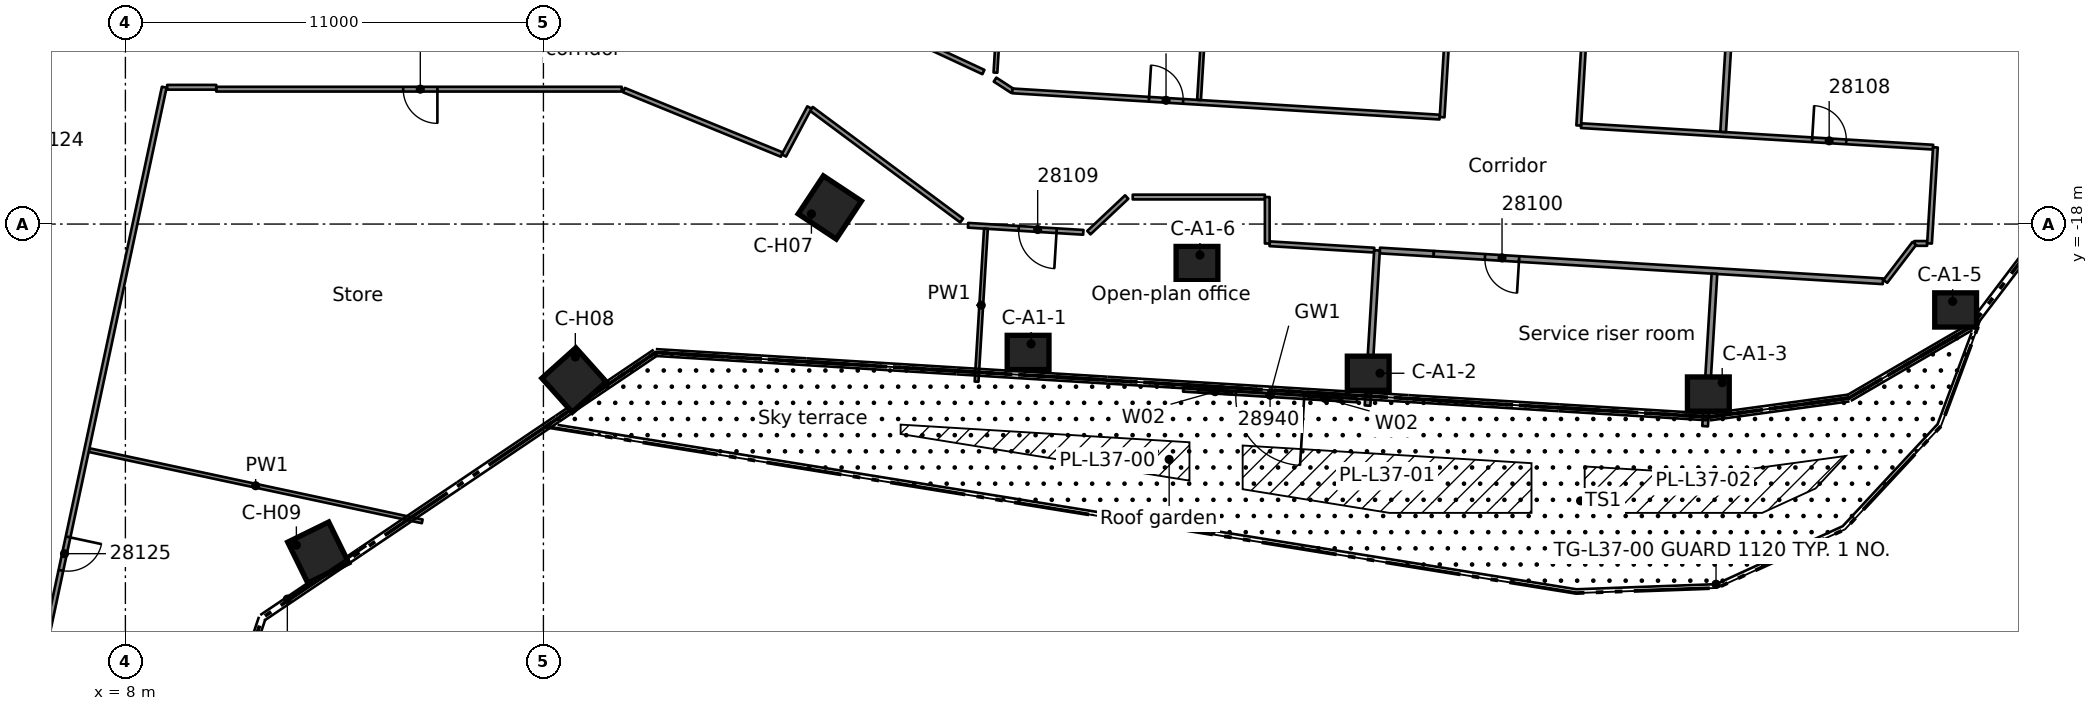
"""IFC4 building model, lengths in metres.
Left out: names, types, materials, properties, quantities, classifications, styles, units other than length and angle.
Written with IfcOpenShell. Run it as: python <this file> out.ifc"""

import sys

from ifc_helpers import new_model, si_unit, direction, frame, frame_2d, origin, origin_2d, place, context, subcontext, project, spatial, rectangle, extrude, element, fill, save


model = new_model("IFC4")
c1 = context("Model", 3, precision=1e-05, world=origin(), true_north=direction((0.0, 1.0)))
c2 = subcontext(c1, "Body", "Model", "MODEL_VIEW")
j1 = project(units=[si_unit("LENGTHUNIT", "METRE"), si_unit("PLANEANGLEUNIT", "RADIAN")], contexts=[c1])
p1 = place(None, origin())
s1 = spatial("IfcSite", under=j1, at=p1, CompositionType="ELEMENT")
p2 = place(p1, origin())
s2 = spatial("IfcBuilding", under=s1, at=p2, CompositionType="ELEMENT")
p3 = place(p2, frame((0.0, 0.0, 145.6)))
s3 = spatial("IfcBuildingStorey", under=s2, at=p3, CompositionType="ELEMENT", Elevation=145.6)
for number, where, z_axis, x_axis in (
    (1, (31.754, -21.378, 0.0), (0.0, 0.0, 1.0), (1.0, 0.0, 0.0)),
    (2, (40.704, -21.926, 0.0), (0.0, 0.0, 1.0), (1.0, 0.0, 0.0)),
    (3, (49.654, -22.473, 0.0), (0.0, 0.0, 1.0), (1.0, 0.0, 0.0)),
    (4, (56.161, -20.26, 0.0), (0.0, 0.0, 1.0), (1.0, 0.0, 0.0)),
    (5, (36.198, -19.039, 0.0), (0.0, 0.0, 1.0), (1.0, 0.0, 0.0)),
):
    element("IfcColumn", number, at=place(p3, frame(where, z_axis=z_axis, x_axis=x_axis)), inside=s3, PredefinedType="COLUMN", context=c2, shape_type="SweptSolid", body=[
        extrude(rectangle(XDim=1.1, YDim=0.9, at=origin_2d()), origin(), (0.0, 0.0, 1.0), 3.5),
    ])
for number, where, z_axis, x_axis in (
    (6, (26.536, -17.564, 0.0), (0.0, 0.0, 1.0), (0.834, -0.552, 0.0)),
    (7, (19.806, -22.104, 0.0), (0.0, 0.0, 1.0), (0.667, -0.745, 0.0)),
    (8, (13.075, -26.644, 0.0), (0.0, 0.0, 1.0), (0.441, -0.898, 0.0)),
):
    element("IfcColumn", number, at=place(p3, frame(where, z_axis=z_axis, x_axis=x_axis)), inside=s3, PredefinedType="COLUMN", context=c2, shape_type="SweptSolid", body=[
        extrude(rectangle(XDim=1.2, YDim=1.2, at=origin_2d()), origin(), (0.0, 0.0, 1.0), 3.5),
    ])
p4 = place(p3, frame((40.407, -22.639, 0.0), z_axis=(0.0, 0.0, 1.0), x_axis=(-0.998136271082, 0.061024456984, 0.0)))
e9 = element("IfcWall", 9, at=p4, inside=s3, PredefinedType="STANDARD", context=c2, shape_type="SweptSolid", body=[
    extrude(rectangle(XDim=4.581, YDim=0.1, at=frame_2d((2.291, 0.0))), origin(), (0.0, 0.0, 1.0), 3.1),
])
p5 = place(p4, frame((1.39, 0.0, 0.0)))
e10 = element("IfcOpeningElement", 10, at=p5, cuts=e9, PredefinedType="OPENING", context=c2, shape_type="SweptSolid", body=[
    extrude(rectangle(XDim=1.8, YDim=2.4, at=frame_2d((0.9, 1.2))), frame((0.0, 0.06, 0.0), z_axis=(0.0, -1.0, 0.0), x_axis=(1.0, 0.0, 0.0)), (0.0, 0.0, 1.0), 0.12),
])
p6 = place(p4, frame((0.39, 0.0, 0.0)))
e11 = element("IfcOpeningElement", 11, at=p6, cuts=e9, PredefinedType="OPENING", context=c2, shape_type="SweptSolid", body=[
    extrude(rectangle(XDim=0.9, YDim=2.4, at=frame_2d((0.45, 1.2))), frame((0.0, 0.06, 0.0), z_axis=(0.0, -1.0, 0.0), x_axis=(1.0, 0.0, 0.0)), (0.0, 0.0, 1.0), 0.12),
])
p7 = place(p4, frame((3.29, 0.0, 0.0)))
e12 = element("IfcOpeningElement", 12, at=p7, cuts=e9, PredefinedType="OPENING", context=c2, shape_type="SweptSolid", body=[
    extrude(rectangle(XDim=0.9, YDim=2.4, at=frame_2d((0.45, 1.2))), frame((0.0, 0.06, 0.0), z_axis=(0.0, -1.0, 0.0), x_axis=(1.0, 0.0, 0.0)), (0.0, 0.0, 1.0), 0.12),
])
p8 = place(p3, frame((26.05, -14.969, 0.0), z_axis=(0.0, 0.0, 1.0), x_axis=(0.802733003706, -0.596338599087, 0.0)))
e13 = element("IfcWall", 13, at=p8, inside=s3, PredefinedType="PARTITIONING", context=c2, shape_type="SweptSolid", body=[
    extrude(rectangle(XDim=4.927, YDim=0.125, at=frame_2d((2.463, 0.0))), origin(), (0.0, 0.0, 1.0), 3.08),
])
p9 = place(p3, frame((30.578, -14.0, 0.0), z_axis=(0.0, 0.0, 1.0), x_axis=(-0.906684476779, 0.421809506257, 0.0)))
e14 = element("IfcWall", 14, at=p9, inside=s3, PredefinedType="PARTITIONING", context=c2, shape_type="SweptSolid", body=[
    extrude(rectangle(XDim=5.927, YDim=0.125, at=frame_2d((2.963, 0.0))), origin(), (0.0, 0.0, 1.0), 3.08),
])
p10 = place(p3, frame((30.884, -14.199, 0.0), z_axis=(0.0, 0.0, 1.0), x_axis=(0.838402684299, -0.545051317731, 0.0)))
e15 = element("IfcWall", 15, at=p10, inside=s3, PredefinedType="PARTITIONING", context=c2, shape_type="SweptSolid", body=[
    extrude(rectangle(XDim=0.545, YDim=0.125, at=frame_2d((0.272, 0.0))), origin(), (0.0, 0.0, 1.0), 3.08),
])
p11 = place(p3, frame((21.118, -14.475, 0.0), z_axis=(0.0, 0.0, 1.0), x_axis=(0.925826662129, -0.377948398187, 0.0)))
e16 = element("IfcWall", 16, at=p11, inside=s3, PredefinedType="PARTITIONING", context=c2, shape_type="SweptSolid", body=[
    extrude(rectangle(XDim=4.487, YDim=0.125, at=frame_2d((2.243, 0.0))), origin(), (0.0, 0.0, 1.0), 3.08),
])
p12 = place(p3, frame((7.044, -23.948, 0.0), z_axis=(0.0, 0.0, 1.0), x_axis=(0.977886023379, -0.209138531316, 0.0)))
e17 = element("IfcWall", 17, at=p12, inside=s3, PredefinedType="PARTITIONING", context=c2, shape_type="SweptSolid", body=[
    extrude(rectangle(XDim=8.965, YDim=0.1, at=frame_2d((4.483, 0.0))), origin(), (0.0, 0.0, 1.0), 3.08),
])
p13 = place(p3, frame((41.01, -18.696, 0.0), z_axis=(0.0, 0.0, 1.0), x_axis=(0.99817100985, -0.060453578023, 0.0)))
e18 = element("IfcWall", 18, at=p13, inside=s3, PredefinedType="PARTITIONING", context=c2, shape_type="SweptSolid", body=[
    extrude(rectangle(XDim=1.422, YDim=0.15, at=frame_2d((0.711, 0.0))), origin(), (0.0, 0.0, 1.0), 3.08),
])
p14 = place(p3, frame((33.207, -18.218, 0.0), z_axis=(0.0, 0.0, 1.0), x_axis=(-0.998124126211, 0.061222779053, 0.0)))
e19 = element("IfcWall", 19, at=p14, inside=s3, PredefinedType="PARTITIONING", context=c2, shape_type="SweptSolid", body=[
    extrude(rectangle(XDim=3.039, YDim=0.125, at=frame_2d((1.519, 0.0))), origin(), (0.0, 0.0, 1.0), 3.08),
])
p15 = place(p14, frame((0.704, 0.0, 0.0)))
e20 = element("IfcOpeningElement", 20, at=p15, cuts=e19, PredefinedType="OPENING", context=c2, shape_type="SweptSolid", body=[
    extrude(rectangle(XDim=1.0, YDim=2.1, at=frame_2d((0.5, 1.05))), frame((0.0, 0.073, 0.0), z_axis=(0.0, -1.0, 0.0), x_axis=(1.0, 0.0, 0.0)), (0.0, 0.0, 1.0), 0.145),
])
p16 = place(p3, frame((38.11, -18.518, 0.0), z_axis=(0.0, 0.0, 1.0), x_axis=(0.998139847716, -0.060965928199, 0.0)))
e21 = element("IfcWall", 21, at=p16, inside=s3, PredefinedType="PARTITIONING", context=c2, shape_type="SweptSolid", body=[
    extrude(rectangle(XDim=2.755, YDim=0.125, at=frame_2d((1.377, 0.0))), origin(), (0.0, 0.0, 1.0), 3.08),
])
p17 = place(p3, frame((54.248, -19.506, 0.0), z_axis=(0.0, 0.0, 1.0), x_axis=(-0.99812844047, 0.061152402438, 0.0)))
e22 = element("IfcWall", 22, at=p17, inside=s3, PredefinedType="PARTITIONING", context=c2, shape_type="SweptSolid", body=[
    extrude(rectangle(XDim=11.841, YDim=0.15, at=frame_2d((5.921, 0.0))), origin(), (0.0, 0.0, 1.0), 3.08),
])
p18 = place(p17, frame((9.592, 0.0, 0.0)))
e23 = element("IfcOpeningElement", 23, at=p18, cuts=e22, PredefinedType="OPENING", context=c2, shape_type="SweptSolid", body=[
    extrude(rectangle(XDim=0.9, YDim=2.1, at=frame_2d((0.45, 1.05))), frame((0.0, 0.085, 0.0), z_axis=(0.0, -1.0, 0.0), x_axis=(1.0, 0.0, 0.0)), (0.0, 0.0, 1.0), 0.17),
])
p19 = place(p3, frame((31.341, -14.496, 0.0), z_axis=(0.0, 0.0, 1.0), x_axis=(0.998121712121, -0.061262123633, 0.0)))
e24 = element("IfcWall", 24, at=p19, inside=s3, PredefinedType="PARTITIONING", context=c2, shape_type="SweptSolid", body=[
    extrude(rectangle(XDim=11.262, YDim=0.125, at=frame_2d((5.631, 0.0))), origin(), (0.0, 0.0, 1.0), 3.08),
])
p20 = place(p19, frame((3.6, 0.0, 0.0)))
e25 = element("IfcOpeningElement", 25, at=p20, cuts=e24, PredefinedType="OPENING", context=c2, shape_type="SweptSolid", body=[
    extrude(rectangle(XDim=0.9, YDim=2.1, at=frame_2d((0.45, 1.05))), frame((0.0, 0.073, 0.0), z_axis=(0.0, -1.0, 0.0), x_axis=(1.0, 0.0, 0.0)), (0.0, 0.0, 1.0), 0.145),
])
p21 = place(p3, frame((46.305, -15.411, 0.0), z_axis=(0.0, 0.0, 1.0), x_axis=(0.998136924193, -0.061013773551, 0.0)))
e26 = element("IfcWall", 26, at=p21, inside=s3, PredefinedType="PARTITIONING", context=c2, shape_type="SweptSolid", body=[
    extrude(rectangle(XDim=9.279, YDim=0.125, at=frame_2d((4.64, 0.0))), origin(), (0.0, 0.0, 1.0), 3.08),
])
p22 = place(p21, frame((6.091, 0.0, 0.0)))
e27 = element("IfcOpeningElement", 27, at=p22, cuts=e26, PredefinedType="OPENING", context=c2, shape_type="SweptSolid", body=[
    extrude(rectangle(XDim=0.9, YDim=2.1, at=frame_2d((0.45, 1.05))), frame((0.0, 0.073, 0.0), z_axis=(0.0, -1.0, 0.0), x_axis=(1.0, 0.0, 0.0)), (0.0, 0.0, 1.0), 0.145),
])
p23 = place(p3, frame((55.073, -18.51, 0.0), z_axis=(0.0, 0.0, 1.0), x_axis=(1.0, 0.0, 0.0)))
e28 = element("IfcWall", 28, at=p23, inside=s3, PredefinedType="PARTITIONING", context=c2, shape_type="SweptSolid", body=[
    extrude(rectangle(XDim=0.338, YDim=0.125, at=frame_2d((0.169, 0.0))), origin(), (0.0, 0.0, 1.0), 3.08),
])
p24 = place(p3, frame((34.507, -17.289, 0.0), z_axis=(0.0, 0.0, 1.0), x_axis=(1.0, 0.0, 0.0)))
e29 = element("IfcWall", 29, at=p24, inside=s3, PredefinedType="PARTITIONING", context=c2, shape_type="SweptSolid", body=[
    extrude(rectangle(XDim=3.477, YDim=0.125, at=frame_2d((1.738, 0.0))), origin(), (0.0, 0.0, 1.0), 3.08),
])
p25 = place(p3, frame((21.06, -14.451, 0.0), z_axis=(0.0, 0.0, 1.0), x_axis=(-1.0, 0.0, 0.0)))
e30 = element("IfcWall", 30, at=p25, inside=s3, PredefinedType="PARTITIONING", context=c2, shape_type="SweptSolid", body=[
    extrude(rectangle(XDim=10.669, YDim=0.125, at=frame_2d((5.334, 0.0))), origin(), (0.0, 0.0, 1.0), 3.08),
])
p26 = place(p25, frame((4.85, 0.0, 0.0)))
e31 = element("IfcOpeningElement", 31, at=p26, cuts=e30, PredefinedType="OPENING", context=c2, shape_type="SweptSolid", body=[
    extrude(rectangle(XDim=0.9, YDim=2.1, at=frame_2d((0.45, 1.05))), frame((0.0, 0.073, 0.0), z_axis=(0.0, -1.0, 0.0), x_axis=(1.0, 0.0, 0.0)), (0.0, 0.0, 1.0), 0.145),
])
p27 = place(p3, frame((9.099, -14.401, 0.0), z_axis=(0.0, 0.0, 1.0), x_axis=(1.0, 0.0, 0.0)))
e32 = element("IfcWall", 32, at=p27, inside=s3, PredefinedType="PARTITIONING", context=c2, shape_type="SweptSolid", body=[
    extrude(rectangle(XDim=1.292, YDim=0.125, at=frame_2d((0.646, 0.0))), origin(), (0.0, 0.0, 1.0), 3.08),
])
p28 = place(p3, frame((33.353, -18.226, 0.0), z_axis=(0.0, 0.0, 1.0), x_axis=(0.728378164572, 0.685175342066, 0.0)))
e33 = element("IfcWall", 33, at=p28, inside=s3, PredefinedType="PARTITIONING", context=c2, shape_type="SweptSolid", body=[
    extrude(rectangle(XDim=1.367, YDim=0.125, at=frame_2d((0.684, 0.0))), origin(), (0.0, 0.0, 1.0), 3.08),
])
p29 = place(p3, frame((26.0, -14.932, 0.0), z_axis=(0.0, 0.0, 1.0), x_axis=(-0.469063701963, -0.883164335501, 0.0)))
e34 = element("IfcWall", 34, at=p29, inside=s3, PredefinedType="PARTITIONING", context=c2, shape_type="SweptSolid", body=[
    extrude(rectangle(XDim=1.43, YDim=0.125, at=frame_2d((0.715, 0.0))), origin(), (0.0, 0.0, 1.0), 3.08),
])
p30 = place(p3, frame((9.022, -14.399, 0.0), z_axis=(0.0, 0.0, 1.0), x_axis=(-0.209107827196, -0.977892589503, 0.0)))
e35 = element("IfcWall", 35, at=p30, inside=s3, PredefinedType="PARTITIONING", context=c2, shape_type="SweptSolid", body=[
    extrude(rectangle(XDim=15.595, YDim=0.125, at=frame_2d((7.797, 0.0))), origin(), (0.0, 0.0, 1.0), 3.08),
])
p31 = place(p30, frame((12.101, 0.0, 0.0)))
e36 = element("IfcOpeningElement", 36, at=p31, cuts=e35, PredefinedType="OPENING", context=c2, shape_type="SweptSolid", body=[
    extrude(rectangle(XDim=0.9, YDim=2.1, at=frame_2d((0.45, 1.05))), frame((0.0, 0.073, 0.0), z_axis=(0.0, -1.0, 0.0), x_axis=(1.0, 0.0, 0.0)), (0.0, 0.0, 1.0), 0.145),
])
p32 = place(p3, frame((55.474, -18.51, 0.0), z_axis=(0.0, 0.0, 1.0), x_axis=(0.061112023101, 0.998130913574, 0.0)))
e37 = element("IfcWall", 37, at=p32, inside=s3, PredefinedType="PARTITIONING", context=c2, shape_type="SweptSolid", body=[
    extrude(rectangle(XDim=2.533, YDim=0.125, at=frame_2d((1.266, 0.0))), origin(), (0.0, 0.0, 1.0), 3.08),
])
p33 = place(p3, frame((49.569, -23.319, 0.0), z_axis=(0.0, 0.0, 1.0), x_axis=(0.060951910255, 0.998140703827, 0.0)))
e38 = element("IfcWall", 38, at=p33, inside=s3, PredefinedType="PARTITIONING", context=c2, shape_type="SweptSolid", body=[
    extrude(rectangle(XDim=4.018, YDim=0.15, at=frame_2d((2.009, 0.0))), origin(), (0.0, 0.0, 1.0), 3.08),
])
p34 = place(p3, frame((50.043, -15.577, 0.0), z_axis=(0.0, 0.0, 1.0), x_axis=(0.061013458126, 0.998136943474, 0.0)))
e39 = element("IfcWall", 39, at=p34, inside=s3, PredefinedType="PARTITIONING", context=c2, shape_type="SweptSolid", body=[
    extrude(rectangle(XDim=23.945, YDim=0.15, at=frame_2d((11.972, 0.0))), origin(), (0.0, 0.0, 1.0), 3.08),
])
p35 = place(p3, frame((47.684, 8.16, 0.0), z_axis=(0.0, 0.0, 1.0), x_axis=(-0.061037952317, -0.998135445907, 0.0)))
e40 = element("IfcWall", 40, at=p35, inside=s3, PredefinedType="PARTITIONING", context=c2, shape_type="SweptSolid", body=[
    extrude(rectangle(XDim=23.611, YDim=0.125, at=frame_2d((11.805, 0.0))), origin(), (0.0, 0.0, 1.0), 3.08),
])
p36 = place(p35, frame((11.35, 0.0, 0.0)))
e41 = element("IfcOpeningElement", 41, at=p36, cuts=e40, PredefinedType="OPENING", context=c2, shape_type="SweptSolid", body=[
    extrude(rectangle(XDim=0.9, YDim=2.1, at=frame_2d((0.45, 1.05))), frame((0.0, 0.073, 0.0), z_axis=(0.0, -1.0, 0.0), x_axis=(1.0, 0.0, 0.0)), (0.0, 0.0, 1.0), 0.145),
])
p37 = place(p3, frame((42.648, -15.188, 0.0), z_axis=(0.0, 0.0, 1.0), x_axis=(0.061030776278, 0.998135884711, 0.0)))
e42 = element("IfcWall", 42, at=p37, inside=s3, PredefinedType="PARTITIONING", context=c2, shape_type="SweptSolid", body=[
    extrude(rectangle(XDim=20.597, YDim=0.125, at=frame_2d((10.299, 0.0))), origin(), (0.0, 0.0, 1.0), 3.08),
])
p38 = place(p37, frame((17.004, 0.0, 0.0)))
e43 = element("IfcOpeningElement", 43, at=p38, cuts=e42, PredefinedType="OPENING", context=c2, shape_type="SweptSolid", body=[
    extrude(rectangle(XDim=0.9, YDim=2.1, at=frame_2d((0.45, 1.05))), frame((0.0, 0.073, 0.0), z_axis=(0.0, -1.0, 0.0), x_axis=(1.0, 0.0, 0.0)), (0.0, 0.0, 1.0), 0.145),
])
p39 = place(p3, frame((40.686, -22.776, 0.0), z_axis=(0.0, 0.0, 1.0), x_axis=(0.060848074347, 0.998147039192, 0.0)))
e44 = element("IfcWall", 44, at=p39, inside=s3, PredefinedType="PARTITIONING", context=c2, shape_type="SweptSolid", body=[
    extrude(rectangle(XDim=4.093, YDim=0.15, at=frame_2d((2.046, 0.0))), origin(), (0.0, 0.0, 1.0), 3.08),
])
p40 = place(p3, frame((36.252, -14.735, 0.0), z_axis=(0.0, 0.0, 1.0), x_axis=(0.061102264475, 0.998131511012, 0.0)))
e45 = element("IfcWall", 45, at=p40, inside=s3, PredefinedType="PARTITIONING", context=c2, shape_type="SweptSolid", body=[
    extrude(rectangle(XDim=23.55, YDim=0.1, at=frame_2d((11.775, 0.0))), origin(), (0.0, 0.0, 1.0), 3.08),
])
p41 = place(p3, frame((30.398, -22.147, 0.0), z_axis=(0.0, 0.0, 1.0), x_axis=(0.061043573774, 0.998135102128, 0.0)))
e46 = element("IfcWall", 46, at=p41, inside=s3, PredefinedType="PARTITIONING", context=c2, shape_type="SweptSolid", body=[
    extrude(rectangle(XDim=4.031, YDim=0.1, at=frame_2d((2.016, 0.0))), origin(), (0.0, 0.0, 1.0), 3.08),
])
p42 = place(p3, frame((30.895, -14.015, 0.0), z_axis=(0.0, 0.0, 1.0), x_axis=(0.061064974054, 0.998133793108, 0.0)))
e47 = element("IfcWall", 47, at=p42, inside=s3, PredefinedType="PARTITIONING", context=c2, shape_type="SweptSolid", body=[
    extrude(rectangle(XDim=23.009, YDim=0.1, at=frame_2d((11.504, 0.0))), origin(), (0.0, 0.0, 1.0), 3.08),
])
p43 = place(p3, frame((54.312, -19.508, 0.0), z_axis=(0.0, 0.0, 1.0), x_axis=(0.60633035637, 0.79521286392, 0.0)))
e48 = element("IfcWall", 48, at=p43, inside=s3, PredefinedType="PARTITIONING", context=c2, shape_type="SweptSolid", body=[
    extrude(rectangle(XDim=1.255, YDim=0.125, at=frame_2d((0.627, 0.0))), origin(), (0.0, 0.0, 1.0), 3.08),
])
p44 = place(p3, frame((38.047, -18.513, 0.0), z_axis=(0.0, 0.0, 1.0), x_axis=(0.0, 1.0, 0.0)))
e49 = element("IfcWall", 49, at=p44, inside=s3, PredefinedType="PARTITIONING", context=c2, shape_type="SweptSolid", body=[
    extrude(rectangle(XDim=1.224, YDim=0.125, at=frame_2d((0.612, 0.0))), origin(), (0.0, 0.0, 1.0), 3.08),
])
p45 = place(p5, origin())
e50 = element("IfcDoor", 50, at=p45, inside=s3, OperationType="DOUBLE_DOOR_SINGLE_SWING", PredefinedType="DOOR", context=c2, shape_type="SweptSolid", body=[
    extrude(rectangle(XDim=1.8, YDim=2.4, at=frame_2d((0.9, 1.2))), frame((0.0, 0.025, 0.0), z_axis=(0.0, -1.0, 0.0), x_axis=(1.0, 0.0, 0.0)), (0.0, 0.0, 1.0), 0.05),
])
fill(e10, e50)
p46 = place(p6, origin())
e51 = element("IfcWindow", 51, at=p46, inside=s3, PartitioningType="SINGLE_PANEL", PredefinedType="WINDOW", context=c2, shape_type="SweptSolid", body=[
    extrude(rectangle(XDim=0.9, YDim=2.4, at=frame_2d((0.45, 1.2))), frame((0.0, 0.03, 0.0), z_axis=(0.0, -1.0, 0.0), x_axis=(1.0, 0.0, 0.0)), (0.0, 0.0, 1.0), 0.06),
])
fill(e11, e51)
p47 = place(p7, origin())
e52 = element("IfcWindow", 52, at=p47, inside=s3, PartitioningType="SINGLE_PANEL", PredefinedType="WINDOW", context=c2, shape_type="SweptSolid", body=[
    extrude(rectangle(XDim=0.9, YDim=2.4, at=frame_2d((0.45, 1.2))), frame((0.0, 0.03, 0.0), z_axis=(0.0, -1.0, 0.0), x_axis=(1.0, 0.0, 0.0)), (0.0, 0.0, 1.0), 0.06),
])
fill(e12, e52)
p48 = place(p18, origin())
e53 = element("IfcDoor", 53, at=p48, inside=s3, OperationType="SINGLE_SWING_RIGHT", PredefinedType="DOOR", context=c2, shape_type="SweptSolid", body=[
    extrude(rectangle(XDim=0.9, YDim=2.1, at=frame_2d((0.45, 1.05))), frame((0.0, 0.025, 0.0), z_axis=(0.0, -1.0, 0.0), x_axis=(1.0, 0.0, 0.0)), (0.0, 0.0, 1.0), 0.05),
])
fill(e23, e53)
p49 = place(p20, origin())
e54 = element("IfcDoor", 54, at=p49, inside=s3, OperationType="SINGLE_SWING_LEFT", PredefinedType="DOOR", context=c2, shape_type="SweptSolid", body=[
    extrude(rectangle(XDim=0.9, YDim=2.1, at=frame_2d((0.45, 1.05))), frame((0.0, 0.025, 0.0), z_axis=(0.0, -1.0, 0.0), x_axis=(1.0, 0.0, 0.0)), (0.0, 0.0, 1.0), 0.05),
])
fill(e25, e54)
p50 = place(p22, origin())
e55 = element("IfcDoor", 55, at=p50, inside=s3, OperationType="SINGLE_SWING_RIGHT", PredefinedType="DOOR", context=c2, shape_type="SweptSolid", body=[
    extrude(rectangle(XDim=0.9, YDim=2.1, at=frame_2d((0.45, 1.05))), frame((0.0, 0.025, 0.0), z_axis=(0.0, -1.0, 0.0), x_axis=(1.0, 0.0, 0.0)), (0.0, 0.0, 1.0), 0.05),
])
fill(e27, e55)
p51 = place(p15, origin())
e56 = element("IfcDoor", 56, at=p51, inside=s3, OperationType="SINGLE_SWING_LEFT", PredefinedType="DOOR", context=c2, shape_type="SweptSolid", body=[
    extrude(rectangle(XDim=1.0, YDim=2.1, at=frame_2d((0.5, 1.05))), frame((0.0, 0.025, 0.0), z_axis=(0.0, -1.0, 0.0), x_axis=(1.0, 0.0, 0.0)), (0.0, 0.0, 1.0), 0.05),
])
fill(e20, e56)
p52 = place(p31, origin())
e57 = element("IfcDoor", 57, at=p52, inside=s3, OperationType="SINGLE_SWING_RIGHT", PredefinedType="DOOR", context=c2, shape_type="SweptSolid", body=[
    extrude(rectangle(XDim=0.9, YDim=2.1, at=frame_2d((0.45, 1.05))), frame((0.0, 0.025, 0.0), z_axis=(0.0, -1.0, 0.0), x_axis=(1.0, 0.0, 0.0)), (0.0, 0.0, 1.0), 0.05),
])
fill(e36, e57)
p53 = place(p26, origin())
e58 = element("IfcDoor", 58, at=p53, inside=s3, OperationType="SINGLE_SWING_LEFT", PredefinedType="DOOR", context=c2, shape_type="SweptSolid", body=[
    extrude(rectangle(XDim=0.9, YDim=2.1, at=frame_2d((0.45, 1.05))), frame((0.0, 0.025, 0.0), z_axis=(0.0, -1.0, 0.0), x_axis=(1.0, 0.0, 0.0)), (0.0, 0.0, 1.0), 0.05),
])
fill(e31, e58)
save(model, sys.argv[1])
